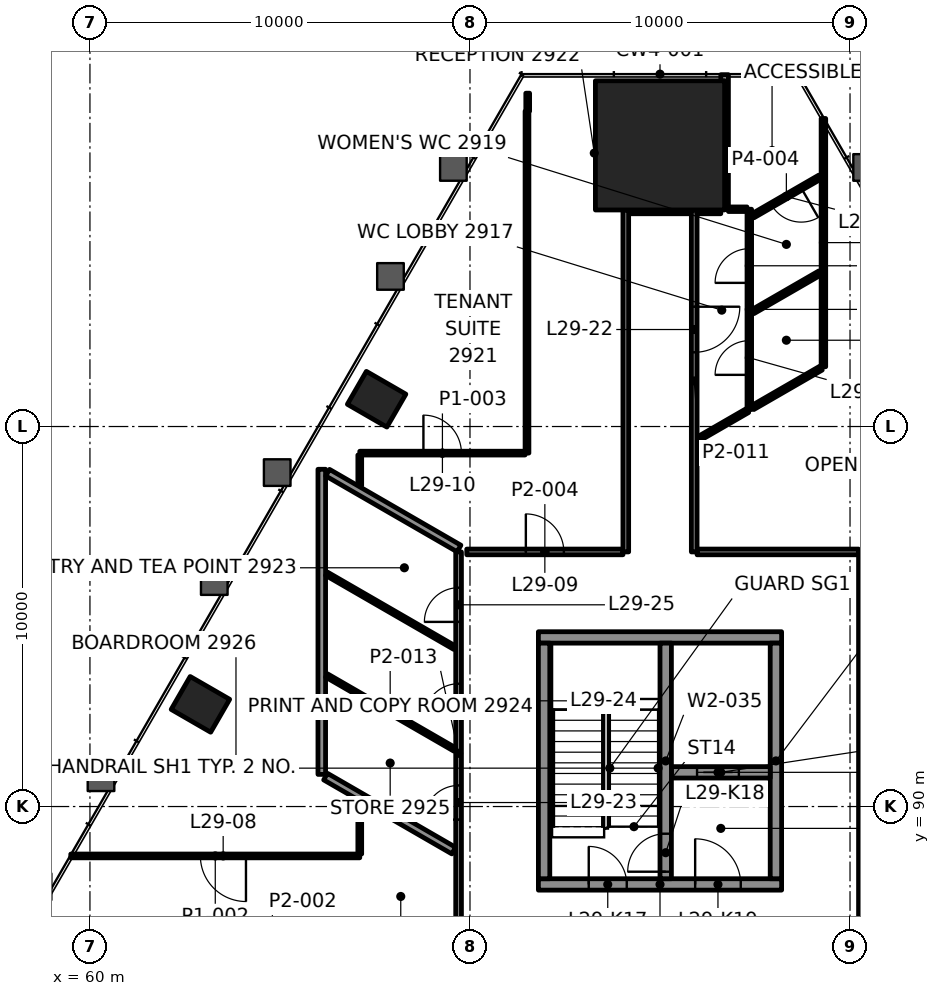
"""IFC4 building model, lengths in metres.
Left out: names, types, materials, properties, quantities, classifications, styles, units other than length and angle.
Written with IfcOpenShell. Run it as: python <this file> out.ifc"""

import sys

from ifc_helpers import new_model, si_unit, direction, frame, frame_2d, origin, origin_2d, place, context, subcontext, project, spatial, rectangle, extrude, element, fill, save


model = new_model("IFC4")
c1 = context("Model", 3, precision=1e-05, world=origin(), true_north=direction((0.0, 1.0)))
c2 = subcontext(c1, "Body", "Model", "MODEL_VIEW")
j1 = project(units=[si_unit("LENGTHUNIT", "METRE"), si_unit("PLANEANGLEUNIT", "RADIAN")], contexts=[c1])
p1 = place(None, origin())
s1 = spatial("IfcSite", under=j1, at=p1, CompositionType="ELEMENT")
p2 = place(p1, origin())
s2 = spatial("IfcBuilding", under=s1, at=p2, CompositionType="ELEMENT")
p3 = place(p2, frame((0.0, 0.0, 128.2)))
s3 = spatial("IfcBuildingStorey", under=s2, at=p3, CompositionType="ELEMENT", Elevation=128.2)
p4 = place(p3, frame((75.0, 107.399, 0.0), z_axis=(0.0, 0.0, 1.0), x_axis=(-1.0, 0.0, 0.0)))
e1 = element("IfcColumn", 1, at=p4, inside=s3, PredefinedType="COLUMN", context=c2, shape_type="SweptSolid", body=[
    extrude(rectangle(XDim=3.4, YDim=3.4, at=origin_2d()), origin(), (0.0, 0.0, 1.0), 4.2),
])
for number, where, z_axis, x_axis in (
    (2, (67.543, 100.719, -0.0), (0.0, 0.0, 1.0), (-0.5, -0.866, 0.0)),
    (3, (62.907, 92.688, -0.0), (0.0, 0.0, 1.0), (-0.5, -0.866, 0.0)),
):
    element("IfcColumn", number, at=place(p3, frame(where, z_axis=z_axis, x_axis=x_axis)), inside=s3, PredefinedType="COLUMN", context=c2, shape_type="SweptSolid", body=[
        extrude(rectangle(XDim=1.0, YDim=1.2, at=origin_2d()), origin(), (0.0, 0.0, 1.0), 4.2),
    ])
p5 = place(p3, frame((71.8, 87.95, 0.0), z_axis=(0.0, 0.0, 1.0), x_axis=(1.0, 0.0, 0.0)))
e4 = element("IfcWall", 4, at=p5, inside=s3, PredefinedType="SHEAR", context=c2, shape_type="SweptSolid", body=[
    extrude(rectangle(XDim=6.4, YDim=0.3, at=frame_2d((3.2, 0.0))), origin(), (0.0, 0.0, 1.0), 4.0),
])
p6 = place(p5, frame((1.325, 0.0, 0.0)))
e5 = element("IfcOpeningElement", 5, at=p6, cuts=e4, PredefinedType="OPENING", context=c2, shape_type="SweptSolid", body=[
    extrude(rectangle(XDim=1.0, YDim=2.1, at=frame_2d((0.5, 1.05))), frame((0.0, 0.16, 0.0), z_axis=(0.0, -1.0, 0.0), x_axis=(1.0, 0.0, 0.0)), (0.0, 0.0, 1.0), 0.32),
])
p7 = place(p5, frame((4.125, 0.0, 0.0)))
e6 = element("IfcOpeningElement", 6, at=p7, cuts=e4, PredefinedType="OPENING", context=c2, shape_type="SweptSolid", body=[
    extrude(rectangle(XDim=1.2, YDim=2.1, at=frame_2d((0.6, 1.05))), frame((0.0, 0.16, 0.0), z_axis=(0.0, -1.0, 0.0), x_axis=(1.0, 0.0, 0.0)), (0.0, 0.0, 1.0), 0.32),
])
p8 = place(p3, frame((71.8, 94.45, 0.0), z_axis=(0.0, 0.0, 1.0), x_axis=(1.0, 0.0, 0.0)))
e7 = element("IfcWall", 7, at=p8, inside=s3, PredefinedType="SHEAR", context=c2, shape_type="SweptSolid", body=[
    extrude(rectangle(XDim=6.4, YDim=0.3, at=frame_2d((3.2, 0.0))), origin(), (0.0, 0.0, 1.0), 4.0),
])
for number, where, z_axis, x_axis in (
    (8, (71.95, 88.1, 0.0), (0.0, 0.0, 1.0), (0.0, 1.0, 0.0)),
    (9, (78.05, 88.1, 0.0), (0.0, 0.0, 1.0), (0.0, 1.0, 0.0)),
):
    element("IfcWall", number, at=place(p3, frame(where, z_axis=z_axis, x_axis=x_axis)), inside=s3, PredefinedType="SHEAR", context=c2, shape_type="SweptSolid", body=[
        extrude(rectangle(XDim=6.2, YDim=0.3, at=frame_2d((3.1, 0.0))), origin(), (0.0, 0.0, 1.0), 4.0),
    ])
p9 = place(p3, frame((75.3, 90.9, 0.0), z_axis=(0.0, 0.0, 1.0), x_axis=(1.0, 0.0, 0.0)))
e10 = element("IfcWall", 10, at=p9, inside=s3, PredefinedType="SHEAR", context=c2, shape_type="SweptSolid", body=[
    extrude(rectangle(XDim=2.6, YDim=0.3, at=frame_2d((1.3, 0.0))), origin(), (0.0, 0.0, 1.0), 4.0),
])
p10 = place(p9, frame((0.675, 0.0, 0.0)))
e11 = element("IfcOpeningElement", 11, at=p10, cuts=e10, PredefinedType="OPENING", context=c2, shape_type="SweptSolid", body=[
    extrude(rectangle(XDim=1.1, YDim=2.1, at=frame_2d((0.55, 1.05))), frame((0.0, 0.16, 0.0), z_axis=(0.0, -1.0, 0.0), x_axis=(1.0, 0.0, 0.0)), (0.0, 0.0, 1.0), 0.32),
])
p11 = place(p3, frame((75.15, 88.1, 0.0), z_axis=(0.0, 0.0, 1.0), x_axis=(0.0, 1.0, 0.0)))
e12 = element("IfcWall", 12, at=p11, inside=s3, PredefinedType="SHEAR", context=c2, shape_type="SweptSolid", body=[
    extrude(rectangle(XDim=6.2, YDim=0.3, at=frame_2d((3.1, 0.0))), origin(), (0.0, 0.0, 1.0), 4.0),
])
p12 = place(p11, frame((0.185, 0.0, 0.0)))
e13 = element("IfcOpeningElement", 13, at=p12, cuts=e12, PredefinedType="OPENING", context=c2, shape_type="SweptSolid", body=[
    extrude(rectangle(XDim=1.0, YDim=2.1, at=frame_2d((0.5, 1.05))), frame((0.0, 0.16, 0.0), z_axis=(0.0, -1.0, 0.0), x_axis=(1.0, 0.0, 0.0)), (0.0, 0.0, 1.0), 0.32),
])
p13 = place(p3, frame((67.1, 88.7, 0.0), z_axis=(0.0, 0.0, 1.0), x_axis=(-1.0, 0.0, 0.0)))
e14 = element("IfcWall", 14, at=p13, inside=s3, PredefinedType="PARTITIONING", context=c2, shape_type="SweptSolid", body=[
    extrude(rectangle(XDim=7.604, YDim=0.1, at=frame_2d((3.802, 0.0))), origin(), (0.0, 0.0, 1.0), 3.165),
])
p14 = place(p13, frame((2.994, 0.0, 0.0)))
e15 = element("IfcOpeningElement", 15, at=p14, cuts=e14, PredefinedType="OPENING", context=c2, shape_type="SweptSolid", body=[
    extrude(rectangle(XDim=1.2, YDim=2.1, at=frame_2d((0.6, 1.05))), frame((0.0, 0.06, 0.0), z_axis=(0.0, -1.0, 0.0), x_axis=(1.0, 0.0, 0.0)), (0.0, 0.0, 1.0), 0.12),
])
p15 = place(p3, frame((69.915, 96.7, 0.0), z_axis=(0.0, 0.0, 1.0), x_axis=(1.0, 0.0, 0.0)))
e16 = element("IfcWall", 16, at=p15, inside=s3, PredefinedType="PARTITIONING", context=c2, shape_type="SweptSolid", body=[
    extrude(rectangle(XDim=4.11, YDim=0.15, at=frame_2d((2.055, 0.0))), origin(), (0.0, 0.0, 1.0), 3.4),
])
p16 = place(p15, frame((1.555, 0.0, 0.0)))
e17 = element("IfcOpeningElement", 17, at=p16, cuts=e16, PredefinedType="OPENING", context=c2, shape_type="SweptSolid", body=[
    extrude(rectangle(XDim=1.0, YDim=2.1, at=frame_2d((0.5, 1.05))), frame((0.0, 0.085, 0.0), z_axis=(0.0, -1.0, 0.0), x_axis=(1.0, 0.0, 0.0)), (0.0, 0.0, 1.0), 0.17),
])
p17 = place(p3, frame((75.975, 96.7, 0.0), z_axis=(0.0, 0.0, 1.0), x_axis=(1.0, 0.0, 0.0)))
e18 = element("IfcWall", 18, at=p17, inside=s3, PredefinedType="PARTITIONING", context=c2, shape_type="SweptSolid", body=[
    extrude(rectangle(XDim=4.249, YDim=0.15, at=frame_2d((2.125, 0.0))), origin(), (0.0, 0.0, 1.0), 3.4),
])
p18 = place(p3, frame((67.1, 99.3, 0.0), z_axis=(0.0, 0.0, 1.0), x_axis=(1.0, 0.0, 0.0)))
e19 = element("IfcWall", 19, at=p18, inside=s3, PredefinedType="PARTITIONING", context=c2, shape_type="SweptSolid", body=[
    extrude(rectangle(XDim=4.349, YDim=0.1, at=frame_2d((2.175, 0.0))), origin(), (0.0, 0.0, 1.0), 3.4),
])
p19 = place(p18, frame((1.675, 0.0, 0.0)))
e20 = element("IfcOpeningElement", 20, at=p19, cuts=e19, PredefinedType="OPENING", context=c2, shape_type="SweptSolid", body=[
    extrude(rectangle(XDim=1.0, YDim=2.1, at=frame_2d((0.5, 1.05))), frame((0.0, 0.06, 0.0), z_axis=(0.0, -1.0, 0.0), x_axis=(1.0, 0.0, 0.0)), (0.0, 0.0, 1.0), 0.12),
])
p20 = place(p3, frame((74.176, 105.699, 0.0), z_axis=(0.0, 0.0, 1.0), x_axis=(1.0, 0.0, 0.0)))
e21 = element("IfcWall", 21, at=p20, inside=s3, PredefinedType="PARTITIONING", context=c2, shape_type="SweptSolid", body=[
    extrude(rectangle(XDim=1.649, YDim=0.2, at=frame_2d((0.825, 0.0))), origin(), (0.0, 0.0, 1.0), 3.397),
])
p21 = place(p3, frame((76.8, 105.718, 0.0), z_axis=(0.0, 0.0, 1.0), x_axis=(1.0, 0.0, 0.0)))
e22 = element("IfcWall", 22, at=p21, inside=s3, PredefinedType="PARTITIONING", context=c2, shape_type="SweptSolid", body=[
    extrude(rectangle(XDim=0.49, YDim=0.12, at=frame_2d((0.245, 0.0))), origin(), (0.0, 0.0, 1.0), 3.4),
])
p22 = place(p3, frame((76.01, 99.673, 0.0), z_axis=(0.0, 0.0, 1.0), x_axis=(0.865943626461, 0.500141615736, 0.0)))
e23 = element("IfcWall", 23, at=p22, inside=s3, PredefinedType="PARTITIONING", context=c2, shape_type="SweptSolid", body=[
    extrude(rectangle(XDim=1.496, YDim=0.12, at=frame_2d((0.748, 0.0))), origin(), (0.0, 0.0, 1.0), 3.4),
])
p23 = place(p3, frame((77.445, 103.024, 0.0), z_axis=(0.0, 0.0, 1.0), x_axis=(0.866039589866, 0.499975428181, 0.0)))
e24 = element("IfcWall", 24, at=p23, inside=s3, PredefinedType="PARTITIONING", context=c2, shape_type="SweptSolid", body=[
    extrude(rectangle(XDim=2.033, YDim=0.12, at=frame_2d((1.016, 0.0))), origin(), (0.0, 0.0, 1.0), 3.4),
])
p24 = place(p3, frame((79.205, 106.562, 0.0), z_axis=(0.0, 0.0, 1.0), x_axis=(-0.866017611601, -0.500013496215, 0.0)))
e25 = element("IfcWall", 25, at=p24, inside=s3, PredefinedType="PARTITIONING", context=c2, shape_type="SweptSolid", body=[
    extrude(rectangle(XDim=2.033, YDim=0.12, at=frame_2d((1.017, 0.0))), origin(), (0.0, 0.0, 1.0), 3.4),
])
p25 = place(p24, frame((0.567, 0.0, 0.0)))
e26 = element("IfcOpeningElement", 26, at=p25, cuts=e25, PredefinedType="OPENING", context=c2, shape_type="SweptSolid", body=[
    extrude(rectangle(XDim=0.9, YDim=2.1, at=frame_2d((0.45, 1.05))), frame((0.0, 0.07, 0.0), z_axis=(0.0, -1.0, 0.0), x_axis=(1.0, 0.0, 0.0)), (0.0, 0.0, 1.0), 0.14),
])
p26 = place(p3, frame((80.3, 86.1, 0.0), z_axis=(0.0, 0.0, 1.0), x_axis=(0.0, 1.0, 0.0)))
e27 = element("IfcWall", 27, at=p26, inside=s3, PredefinedType="PARTITIONING", context=c2, shape_type="SweptSolid", body=[
    extrude(rectangle(XDim=10.599, YDim=0.15, at=frame_2d((5.3, 0.0))), origin(), (0.0, 0.0, 1.0), 3.322),
])
p27 = place(p3, frame((79.3, 101.573, 0.0), z_axis=(0.0, 0.0, 1.0), x_axis=(0.0, 1.0, 0.0)))
e28 = element("IfcWall", 28, at=p27, inside=s3, PredefinedType="PARTITIONING", context=c2, shape_type="SweptSolid", body=[
    extrude(rectangle(XDim=6.533, YDim=0.12, at=frame_2d((3.267, 0.0))), origin(), (0.0, 0.0, 1.0), 3.4),
])
p28 = place(p3, frame((77.35, 100.447, 0.0), z_axis=(0.0, 0.0, 1.0), x_axis=(0.0, 1.0, 0.0)))
e29 = element("IfcWall", 29, at=p28, inside=s3, PredefinedType="PARTITIONING", context=c2, shape_type="SweptSolid", body=[
    extrude(rectangle(XDim=5.271, YDim=0.12, at=frame_2d((2.635, 0.0))), origin(), (0.0, 0.0, 1.0), 3.4),
])
p29 = place(p28, frame((0.913, 0.0, 0.0)))
e30 = element("IfcOpeningElement", 30, at=p29, cuts=e29, PredefinedType="OPENING", context=c2, shape_type="SweptSolid", body=[
    extrude(rectangle(XDim=0.9, YDim=2.1, at=frame_2d((0.45, 1.05))), frame((0.0, 0.07, 0.0), z_axis=(0.0, -1.0, 0.0), x_axis=(1.0, 0.0, 0.0)), (0.0, 0.0, 1.0), 0.14),
])
p30 = place(p28, frame((3.333, 0.0, 0.0)))
e31 = element("IfcOpeningElement", 31, at=p30, cuts=e29, PredefinedType="OPENING", context=c2, shape_type="SweptSolid", body=[
    extrude(rectangle(XDim=0.9, YDim=2.1, at=frame_2d((0.45, 1.05))), frame((0.0, 0.07, 0.0), z_axis=(0.0, -1.0, 0.0), x_axis=(1.0, 0.0, 0.0)), (0.0, 0.0, 1.0), 0.14),
])
p31 = place(p3, frame((76.7, 105.715, 0.0), z_axis=(0.0, 0.0, 1.0), x_axis=(0.0, 1.0, 0.0)))
e32 = element("IfcWall", 32, at=p31, inside=s3, PredefinedType="PARTITIONING", context=c2, shape_type="SweptSolid", body=[
    extrude(rectangle(XDim=3.543, YDim=0.2, at=frame_2d((1.772, 0.0))), origin(), (0.0, 0.0, 1.0), 3.4),
])
p32 = place(p3, frame((75.9, 105.698, 0.0), z_axis=(0.0, 0.0, 1.0), x_axis=(0.0, -1.0, 0.0)))
e33 = element("IfcWall", 33, at=p32, inside=s3, PredefinedType="PARTITIONING", context=c2, shape_type="SweptSolid", body=[
    extrude(rectangle(XDim=8.999, YDim=0.15, at=frame_2d((4.499, 0.0))), origin(), (0.0, 0.0, 1.0), 3.4),
])
p33 = place(p32, frame((2.546, 0.0, 0.0)))
e34 = element("IfcOpeningElement", 34, at=p33, cuts=e33, PredefinedType="OPENING", context=c2, shape_type="SweptSolid", body=[
    extrude(rectangle(XDim=1.2, YDim=2.1, at=frame_2d((0.6, 1.05))), frame((0.0, 0.085, 0.0), z_axis=(0.0, -1.0, 0.0), x_axis=(1.0, 0.0, 0.0)), (0.0, 0.0, 1.0), 0.17),
])
p34 = place(p3, frame((74.1, 96.7, 0.0), z_axis=(0.0, 0.0, 1.0), x_axis=(0.0, 1.0, 0.0)))
e35 = element("IfcWall", 35, at=p34, inside=s3, PredefinedType="PARTITIONING", context=c2, shape_type="SweptSolid", body=[
    extrude(rectangle(XDim=8.998, YDim=0.15, at=frame_2d((4.499, 0.0))), origin(), (0.0, 0.0, 1.0), 3.4),
])
p35 = place(p3, frame((71.519, 108.299, 0.0), z_axis=(0.0, 0.0, 1.0), x_axis=(0.0, 1.0, 0.0)))
e36 = element("IfcWall", 36, at=p35, inside=s3, PredefinedType="PARTITIONING", context=c2, shape_type="SweptSolid", body=[
    extrude(rectangle(XDim=0.473, YDim=0.1, at=frame_2d((0.236, 0.0))), origin(), (0.0, 0.0, 1.0), 3.4),
])
p36 = place(p3, frame((71.5, 99.301, 0.0), z_axis=(0.0, 0.0, 1.0), x_axis=(0.0, 1.0, 0.0)))
e37 = element("IfcWall", 37, at=p36, inside=s3, PredefinedType="PARTITIONING", context=c2, shape_type="SweptSolid", body=[
    extrude(rectangle(XDim=8.998, YDim=0.1, at=frame_2d((4.499, 0.0))), origin(), (0.0, 0.0, 1.0), 3.4),
])
p37 = place(p3, frame((69.7, 86.1, 0.0), z_axis=(0.0, 0.0, 1.0), x_axis=(0.0, 1.0, 0.0)))
e38 = element("IfcWall", 38, at=p37, inside=s3, PredefinedType="PARTITIONING", context=c2, shape_type="SweptSolid", body=[
    extrude(rectangle(XDim=10.6, YDim=0.15, at=frame_2d((5.3, 0.0))), origin(), (0.0, 0.0, 1.0), 3.322),
])
p38 = place(p37, frame((3.555, 0.0, 0.0)))
e39 = element("IfcOpeningElement", 39, at=p38, cuts=e38, PredefinedType="OPENING", context=c2, shape_type="SweptSolid", body=[
    extrude(rectangle(XDim=0.9, YDim=2.1, at=frame_2d((0.45, 1.05))), frame((0.0, 0.085, 0.0), z_axis=(0.0, -1.0, 0.0), x_axis=(1.0, 0.0, 0.0)), (0.0, 0.0, 1.0), 0.17),
])
p39 = place(p37, frame((6.232, 0.0, 0.0)))
e40 = element("IfcOpeningElement", 40, at=p39, cuts=e38, PredefinedType="OPENING", context=c2, shape_type="SweptSolid", body=[
    extrude(rectangle(XDim=0.9, YDim=2.1, at=frame_2d((0.45, 1.05))), frame((0.0, 0.085, 0.0), z_axis=(0.0, -1.0, 0.0), x_axis=(1.0, 0.0, 0.0)), (0.0, 0.0, 1.0), 0.17),
])
p40 = place(p37, frame((8.759, 0.0, 0.0)))
e41 = element("IfcOpeningElement", 41, at=p40, cuts=e38, PredefinedType="OPENING", context=c2, shape_type="SweptSolid", body=[
    extrude(rectangle(XDim=0.9, YDim=2.1, at=frame_2d((0.45, 1.05))), frame((0.0, 0.085, 0.0), z_axis=(0.0, -1.0, 0.0), x_axis=(1.0, 0.0, 0.0)), (0.0, 0.0, 1.0), 0.17),
])
p41 = place(p3, frame((67.1, 88.75, 0.0), z_axis=(0.0, 0.0, 1.0), x_axis=(0.0, 1.0, 0.0)))
e42 = element("IfcWall", 42, at=p41, inside=s3, PredefinedType="PARTITIONING", context=c2, shape_type="SweptSolid", body=[
    extrude(rectangle(XDim=1.372, YDim=0.1, at=frame_2d((0.686, 0.0))), origin(), (0.0, 0.0, 1.0), 3.322),
])
p42 = place(p3, frame((67.1, 98.443, 0.0), z_axis=(0.0, 0.0, 1.0), x_axis=(0.0, 1.0, 0.0)))
e43 = element("IfcWall", 43, at=p42, inside=s3, PredefinedType="PARTITIONING", context=c2, shape_type="SweptSolid", body=[
    extrude(rectangle(XDim=0.807, YDim=0.1, at=frame_2d((0.403, 0.0))), origin(), (0.0, 0.0, 1.0), 3.4),
])
p43 = place(p3, frame((66.1, 90.846, 0.0), z_axis=(0.0, 0.0, 1.0), x_axis=(0.0, 1.0, 0.0)))
e44 = element("IfcWall", 44, at=p43, inside=s3, PredefinedType="PARTITIONING", context=c2, shape_type="SweptSolid", body=[
    extrude(rectangle(XDim=8.029, YDim=0.2, at=frame_2d((4.014, 0.0))), origin(), (0.0, 0.0, 1.0), 3.165),
])
p44 = place(p3, frame((69.711, 96.79, 0.0), z_axis=(0.0, 0.0, 1.0), x_axis=(-0.866021621257, 0.500006551472, 0.0)))
e45 = element("IfcWall", 45, at=p44, inside=s3, PredefinedType="PARTITIONING", context=c2, shape_type="SweptSolid", body=[
    extrude(rectangle(XDim=3.992, YDim=0.2, at=frame_2d((1.996, 0.0))), origin(), (0.0, 0.0, 1.0), 3.165),
])
p45 = place(p3, frame((69.599, 94.178, 0.0), z_axis=(0.0, 0.0, 1.0), x_axis=(-0.866016482536, 0.500015451737, 0.0)))
e46 = element("IfcWall", 46, at=p45, inside=s3, PredefinedType="PARTITIONING", context=c2, shape_type="SweptSolid", body=[
    extrude(rectangle(XDim=3.895, YDim=0.1, at=frame_2d((1.948, 0.0))), origin(), (0.0, 0.0, 1.0), 3.4),
])
p46 = place(p3, frame((69.599, 91.501, 0.0), z_axis=(0.0, 0.0, 1.0), x_axis=(-0.866043624834, 0.499968438888, 0.0)))
e47 = element("IfcWall", 47, at=p46, inside=s3, PredefinedType="PARTITIONING", context=c2, shape_type="SweptSolid", body=[
    extrude(rectangle(XDim=3.895, YDim=0.1, at=frame_2d((1.947, 0.0))), origin(), (0.0, 0.0, 1.0), 3.4),
])
p47 = place(p3, frame((69.573, 88.84, 0.0), z_axis=(0.0, 0.0, 1.0), x_axis=(-0.866043624834, 0.499968438888, 0.0)))
e48 = element("IfcWall", 48, at=p47, inside=s3, PredefinedType="PARTITIONING", context=c2, shape_type="SweptSolid", body=[
    extrude(rectangle(XDim=3.895, YDim=0.2, at=frame_2d((1.947, 0.0))), origin(), (0.0, 0.0, 1.0), 3.322),
])
p48 = place(p3, frame((75.975, 105.699, 0.0), z_axis=(0.0, 0.0, 1.0), x_axis=(1.0, 0.0, 0.0)))
e49 = element("IfcWall", 49, at=p48, inside=s3, PredefinedType="PARTITIONING", context=c2, shape_type="SweptSolid", body=[
    extrude(rectangle(XDim=0.625, YDim=0.2, at=frame_2d((0.312, 0.0))), origin(), (0.0, 0.0, 1.0), 3.4),
])
p49 = place(p3, frame((77.44, 100.499, 0.0), z_axis=(0.0, 0.0, 1.0), x_axis=(0.865986040326, 0.500068173313, 0.0)))
e50 = element("IfcWall", 50, at=p49, inside=s3, PredefinedType="PARTITIONING", context=c2, shape_type="SweptSolid", body=[
    extrude(rectangle(XDim=2.078, YDim=0.12, at=frame_2d((1.039, 0.0))), origin(), (0.0, 0.0, 1.0), 3.4),
])
p50 = place(p14, origin())
e51 = element("IfcDoor", 51, at=p50, inside=s3, OperationType="DOUBLE_DOOR_SINGLE_SWING", PredefinedType="DOOR", context=c2, shape_type="SweptSolid", body=[
    extrude(rectangle(XDim=1.2, YDim=2.1, at=frame_2d((0.6, 1.05))), frame((0.0, 0.025, 0.0), z_axis=(0.0, -1.0, 0.0), x_axis=(1.0, 0.0, 0.0)), (0.0, 0.0, 1.0), 0.05),
])
fill(e15, e51)
p51 = place(p16, origin())
e52 = element("IfcDoor", 52, at=p51, inside=s3, OperationType="SINGLE_SWING_LEFT", PredefinedType="DOOR", context=c2, shape_type="SweptSolid", body=[
    extrude(rectangle(XDim=1.0, YDim=2.1, at=frame_2d((0.5, 1.05))), frame((0.0, 0.025, 0.0), z_axis=(0.0, -1.0, 0.0), x_axis=(1.0, 0.0, 0.0)), (0.0, 0.0, 1.0), 0.05),
])
fill(e17, e52)
p52 = place(p19, origin())
e53 = element("IfcDoor", 53, at=p52, inside=s3, OperationType="SINGLE_SWING_RIGHT", PredefinedType="DOOR", context=c2, shape_type="SweptSolid", body=[
    extrude(rectangle(XDim=1.0, YDim=2.1, at=frame_2d((0.5, 1.05))), frame((0.0, 0.025, 0.0), z_axis=(0.0, -1.0, 0.0), x_axis=(1.0, 0.0, 0.0)), (0.0, 0.0, 1.0), 0.05),
])
fill(e20, e53)
p53 = place(p25, origin())
e54 = element("IfcDoor", 54, at=p53, inside=s3, OperationType="SINGLE_SWING_RIGHT", PredefinedType="DOOR", context=c2, shape_type="SweptSolid", body=[
    extrude(rectangle(XDim=0.9, YDim=2.1, at=frame_2d((0.45, 1.05))), frame((0.0, 0.025, 0.0), z_axis=(0.0, -1.0, 0.0), x_axis=(1.0, 0.0, 0.0)), (0.0, 0.0, 1.0), 0.05),
])
fill(e26, e54)
p54 = place(p29, origin())
e55 = element("IfcDoor", 55, at=p54, inside=s3, OperationType="SINGLE_SWING_LEFT", PredefinedType="DOOR", context=c2, shape_type="SweptSolid", body=[
    extrude(rectangle(XDim=0.9, YDim=2.1, at=frame_2d((0.45, 1.05))), frame((0.0, 0.025, 0.0), z_axis=(0.0, -1.0, 0.0), x_axis=(1.0, 0.0, 0.0)), (0.0, 0.0, 1.0), 0.05),
])
fill(e30, e55)
p55 = place(p30, origin())
e56 = element("IfcDoor", 56, at=p55, inside=s3, OperationType="SINGLE_SWING_RIGHT", PredefinedType="DOOR", context=c2, shape_type="SweptSolid", body=[
    extrude(rectangle(XDim=0.9, YDim=2.1, at=frame_2d((0.45, 1.05))), frame((0.0, 0.025, 0.0), z_axis=(0.0, -1.0, 0.0), x_axis=(1.0, 0.0, 0.0)), (0.0, 0.0, 1.0), 0.05),
])
fill(e31, e56)
p56 = place(p33, origin())
e57 = element("IfcDoor", 57, at=p56, inside=s3, OperationType="DOUBLE_DOOR_SINGLE_SWING", PredefinedType="DOOR", context=c2, shape_type="SweptSolid", body=[
    extrude(rectangle(XDim=1.2, YDim=2.1, at=frame_2d((0.6, 1.05))), frame((0.0, 0.025, 0.0), z_axis=(0.0, -1.0, 0.0), x_axis=(1.0, 0.0, 0.0)), (0.0, 0.0, 1.0), 0.05),
])
fill(e34, e57)
p57 = place(p38, origin())
e58 = element("IfcDoor", 58, at=p57, inside=s3, OperationType="SINGLE_SWING_RIGHT", PredefinedType="DOOR", context=c2, shape_type="SweptSolid", body=[
    extrude(rectangle(XDim=0.9, YDim=2.1, at=frame_2d((0.45, 1.05))), frame((0.0, 0.025, 0.0), z_axis=(0.0, -1.0, 0.0), x_axis=(1.0, 0.0, 0.0)), (0.0, 0.0, 1.0), 0.05),
])
fill(e39, e58)
p58 = place(p39, origin())
e59 = element("IfcDoor", 59, at=p58, inside=s3, OperationType="SINGLE_SWING_LEFT", PredefinedType="DOOR", context=c2, shape_type="SweptSolid", body=[
    extrude(rectangle(XDim=0.9, YDim=2.1, at=frame_2d((0.45, 1.05))), frame((0.0, 0.025, 0.0), z_axis=(0.0, -1.0, 0.0), x_axis=(1.0, 0.0, 0.0)), (0.0, 0.0, 1.0), 0.05),
])
fill(e40, e59)
p59 = place(p40, origin())
e60 = element("IfcDoor", 60, at=p59, inside=s3, OperationType="SINGLE_SWING_RIGHT", PredefinedType="DOOR", context=c2, shape_type="SweptSolid", body=[
    extrude(rectangle(XDim=0.9, YDim=2.1, at=frame_2d((0.45, 1.05))), frame((0.0, 0.025, 0.0), z_axis=(0.0, -1.0, 0.0), x_axis=(1.0, 0.0, 0.0)), (0.0, 0.0, 1.0), 0.05),
])
fill(e41, e60)
p60 = place(p10, origin())
e61 = element("IfcDoor", 61, at=p60, inside=s3, OperationType="DOUBLE_DOOR_SLIDING", PredefinedType="DOOR", context=c2, shape_type="SweptSolid", body=[
    extrude(rectangle(XDim=1.1, YDim=2.1, at=frame_2d((0.55, 1.05))), frame((0.0, 0.025, 0.0), z_axis=(0.0, -1.0, 0.0), x_axis=(1.0, 0.0, 0.0)), (0.0, 0.0, 1.0), 0.05),
])
fill(e11, e61)
p61 = place(p6, origin())
e62 = element("IfcDoor", 62, at=p61, inside=s3, OperationType="SINGLE_SWING_RIGHT", PredefinedType="DOOR", context=c2, shape_type="SweptSolid", body=[
    extrude(rectangle(XDim=1.0, YDim=2.1, at=frame_2d((0.5, 1.05))), frame((0.0, 0.025, 0.0), z_axis=(0.0, -1.0, 0.0), x_axis=(1.0, 0.0, 0.0)), (0.0, 0.0, 1.0), 0.05),
])
fill(e5, e62)
p62 = place(p12, origin())
e63 = element("IfcDoor", 63, at=p62, inside=s3, OperationType="SINGLE_SWING_LEFT", PredefinedType="DOOR", context=c2, shape_type="SweptSolid", body=[
    extrude(rectangle(XDim=1.0, YDim=2.1, at=frame_2d((0.5, 1.05))), frame((0.0, 0.025, 0.0), z_axis=(0.0, -1.0, 0.0), x_axis=(1.0, 0.0, 0.0)), (0.0, 0.0, 1.0), 0.05),
])
fill(e13, e63)
p63 = place(p7, origin())
e64 = element("IfcDoor", 64, at=p63, inside=s3, OperationType="SINGLE_SWING_RIGHT", PredefinedType="DOOR", context=c2, shape_type="SweptSolid", body=[
    extrude(rectangle(XDim=1.2, YDim=2.1, at=frame_2d((0.6, 1.05))), frame((0.0, 0.025, 0.0), z_axis=(0.0, -1.0, 0.0), x_axis=(1.0, 0.0, 0.0)), (0.0, 0.0, 1.0), 0.05),
])
fill(e6, e64)
save(model, sys.argv[1])
